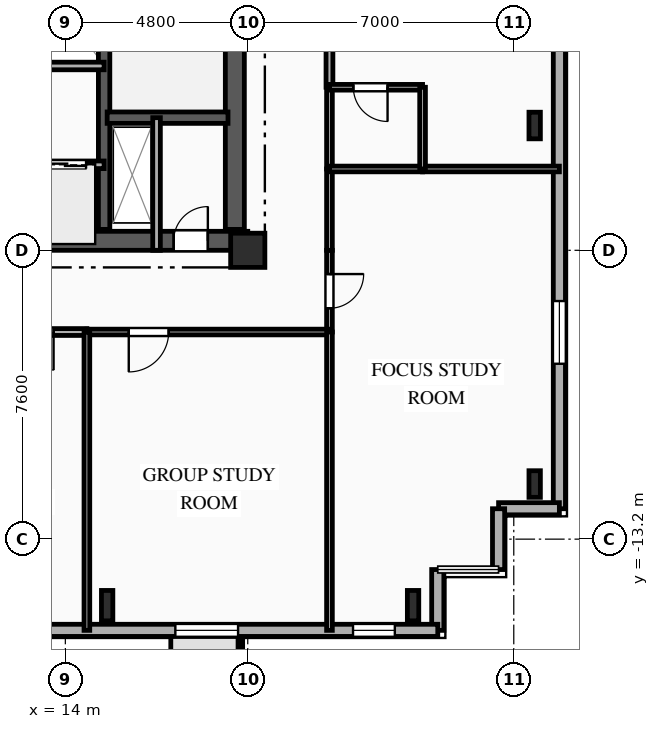
"""IFC4 building model, lengths in metres.
Left out: names, types, materials, properties, quantities, classifications, styles, units other than length and angle.
Written with IfcOpenShell. Run it as: python <this file> out.ifc"""

import sys

from ifc_helpers import new_model, si_unit, direction, frame, frame_2d, origin, origin_2d, place, context, subcontext, project, spatial, rectangle, i_section, extrude, element, fill, save


model = new_model("IFC4")
c1 = context("Model", 3, precision=1e-05, world=origin(), true_north=direction((0.0, 1.0)))
c2 = subcontext(c1, "Body", "Model", "MODEL_VIEW")
j1 = project(units=[si_unit("LENGTHUNIT", "METRE"), si_unit("PLANEANGLEUNIT", "RADIAN")], contexts=[c1])
p1 = place(None, origin())
s1 = spatial("IfcSite", under=j1, at=p1, CompositionType="ELEMENT")
p2 = place(p1, origin())
s2 = spatial("IfcBuilding", under=s1, at=p2, CompositionType="ELEMENT")
p3 = place(p2, frame((0.0, 0.0, 144.4)))
s3 = spatial("IfcBuildingStorey", under=s2, at=p3, CompositionType="ELEMENT", Elevation=144.4)
p4 = place(p3, frame((18.8, -5.6, 0.0), z_axis=(0.0, 0.0, 1.0), x_axis=(1.0, 0.0, 0.0)))
e1 = element("IfcColumn", 1, at=p4, inside=s3, PredefinedType="COLUMN", context=c2, shape_type="SweptSolid", body=[
    extrude(rectangle(XDim=0.9, YDim=0.9, at=origin_2d()), origin(), (0.0, 0.0, 1.0), 3.35),
])
for number, where, z_axis, x_axis in (
    (2, (15.1, -14.95, 0.0), (0.0, 0.0, 1.0), (1.0, 0.0, 0.0)),
    (3, (23.15, -14.95, 0.0), (0.0, 0.0, 1.0), (1.0, 0.0, 0.0)),
):
    element("IfcColumn", number, at=place(p3, frame(where, z_axis=z_axis, x_axis=x_axis)), inside=s3, PredefinedType="COLUMN", context=c2, shape_type="SweptSolid", body=[
        extrude(i_section(OverallWidth=0.3, OverallDepth=0.8, WebThickness=0.018, FlangeThickness=0.033, FilletRadius=0.03, at=origin_2d()), origin(), (0.0, 0.0, 1.0), 3.35),
    ])
for number, where, z_axis, x_axis in (
    (4, (26.35, -11.75, 0.0), (0.0, 0.0, 1.0), (1.0, 0.0, 0.0)),
    (5, (26.35, -2.317, 0.0), (0.0, 0.0, 1.0), (1.0, 0.0, 0.0)),
):
    element("IfcColumn", number, at=place(p3, frame(where, z_axis=z_axis, x_axis=x_axis)), inside=s3, PredefinedType="COLUMN", context=c2, shape_type="SweptSolid", body=[
        extrude(i_section(OverallWidth=0.3, OverallDepth=0.7, WebThickness=0.017, FlangeThickness=0.032, FilletRadius=0.027, at=origin_2d()), origin(), (0.0, 0.0, 1.0), 3.35),
    ])
p5 = place(p3, frame((27.0, 17.2, 0.0), z_axis=(0.0, 0.0, 1.0), x_axis=(0.0, -1.0, 0.0)))
e6 = element("IfcWall", 6, at=p5, inside=s3, PredefinedType="SOLIDWALL", context=c2, shape_type="SweptSolid", body=[
    extrude(rectangle(XDim=29.6, YDim=0.32, at=frame_2d((14.8, 0.0))), origin(), (0.0, 0.0, 1.0), 3.04),
])
p6 = place(p5, frame((3.895, 0.0, 0.85)))
e7 = element("IfcOpeningElement", 7, at=p6, cuts=e6, PredefinedType="OPENING", context=c2, shape_type="SweptSolid", body=[
    extrude(rectangle(XDim=1.65, YDim=1.85, at=frame_2d((0.825, 0.925))), frame((0.0, 0.17, 0.0), z_axis=(0.0, -1.0, 0.0), x_axis=(1.0, 0.0, 0.0)), (0.0, 0.0, 1.0), 0.34),
])
p7 = place(p5, frame((13.74, 0.0, 0.85)))
e8 = element("IfcOpeningElement", 8, at=p7, cuts=e6, PredefinedType="OPENING", context=c2, shape_type="SweptSolid", body=[
    extrude(rectangle(XDim=2.2, YDim=1.85, at=frame_2d((1.1, 0.925))), frame((0.0, 0.17, 0.0), z_axis=(0.0, -1.0, 0.0), x_axis=(1.0, 0.0, 0.0)), (0.0, 0.0, 1.0), 0.34),
])
p8 = place(p5, frame((24.135, 0.0, 0.85)))
e9 = element("IfcOpeningElement", 9, at=p8, cuts=e6, PredefinedType="OPENING", context=c2, shape_type="SweptSolid", body=[
    extrude(rectangle(XDim=1.65, YDim=1.85, at=frame_2d((0.825, 0.925))), frame((0.0, 0.17, 0.0), z_axis=(0.0, -1.0, 0.0), x_axis=(1.0, 0.0, 0.0)), (0.0, 0.0, 1.0), 0.34),
])
for number, where, z_axis, x_axis in (
    (10, (27.0, -12.4, 0.0), (0.0, 0.0, 1.0), (-1.0, 0.0, 0.0)),
    (11, (25.4, -12.4, 0.0), (0.0, 0.0, 1.0), (0.0, -1.0, 0.0)),
    (12, (23.8, -14.0, 0.0), (0.0, 0.0, 1.0), (0.0, -1.0, 0.0)),
):
    element("IfcWall", number, at=place(p3, frame(where, z_axis=z_axis, x_axis=x_axis)), inside=s3, PredefinedType="SOLIDWALL", context=c2, shape_type="SweptSolid", body=[
        extrude(rectangle(XDim=1.6, YDim=0.32, at=frame_2d((0.8, 0.0))), origin(), (0.0, 0.0, 1.0), 3.04),
    ])
p9 = place(p3, frame((23.8, -15.6, 0.0), z_axis=(0.0, 0.0, 1.0), x_axis=(-1.0, 0.0, 0.0)))
e13 = element("IfcWall", 13, at=p9, inside=s3, PredefinedType="SOLIDWALL", context=c2, shape_type="SweptSolid", body=[
    extrude(rectangle(XDim=49.6, YDim=0.32, at=frame_2d((24.8, 0.0))), origin(), (0.0, 0.0, 1.0), 3.04),
])
p10 = place(p9, frame((1.13, 0.0, 0.85)))
e14 = element("IfcOpeningElement", 14, at=p10, cuts=e13, PredefinedType="OPENING", context=c2, shape_type="SweptSolid", body=[
    extrude(rectangle(XDim=1.1, YDim=1.85, at=frame_2d((0.55, 0.925))), frame((0.0, 0.17, 0.0), z_axis=(0.0, -1.0, 0.0), x_axis=(1.0, 0.0, 0.0)), (0.0, 0.0, 1.0), 0.34),
])
p11 = place(p9, frame((5.255, 0.0, 0.85)))
e15 = element("IfcOpeningElement", 15, at=p11, cuts=e13, PredefinedType="OPENING", context=c2, shape_type="SweptSolid", body=[
    extrude(rectangle(XDim=1.65, YDim=1.85, at=frame_2d((0.825, 0.925))), frame((0.0, 0.17, 0.0), z_axis=(0.0, -1.0, 0.0), x_axis=(1.0, 0.0, 0.0)), (0.0, 0.0, 1.0), 0.34),
])
p12 = place(p9, frame((11.66, 0.0, 0.85)))
e16 = element("IfcOpeningElement", 16, at=p12, cuts=e13, PredefinedType="OPENING", context=c2, shape_type="SweptSolid", body=[
    extrude(rectangle(XDim=2.2, YDim=1.85, at=frame_2d((1.1, 0.925))), frame((0.0, 0.17, 0.0), z_axis=(0.0, -1.0, 0.0), x_axis=(1.0, 0.0, 0.0)), (0.0, 0.0, 1.0), 0.34),
])
p13 = place(p9, frame((18.66, 0.0, 0.85)))
e17 = element("IfcOpeningElement", 17, at=p13, cuts=e13, PredefinedType="OPENING", context=c2, shape_type="SweptSolid", body=[
    extrude(rectangle(XDim=2.2, YDim=1.85, at=frame_2d((1.1, 0.925))), frame((0.0, 0.17, 0.0), z_axis=(0.0, -1.0, 0.0), x_axis=(1.0, 0.0, 0.0)), (0.0, 0.0, 1.0), 0.34),
])
p14 = place(p9, frame((25.66, 0.0, 0.85)))
e18 = element("IfcOpeningElement", 18, at=p14, cuts=e13, PredefinedType="OPENING", context=c2, shape_type="SweptSolid", body=[
    extrude(rectangle(XDim=2.2, YDim=1.85, at=frame_2d((1.1, 0.925))), frame((0.0, 0.17, 0.0), z_axis=(0.0, -1.0, 0.0), x_axis=(1.0, 0.0, 0.0)), (0.0, 0.0, 1.0), 0.34),
])
p15 = place(p9, frame((33.268, 0.0, 0.85)))
e19 = element("IfcOpeningElement", 19, at=p15, cuts=e13, PredefinedType="OPENING", context=c2, shape_type="SweptSolid", body=[
    extrude(rectangle(XDim=2.2, YDim=1.85, at=frame_2d((1.1, 0.925))), frame((0.0, 0.17, 0.0), z_axis=(0.0, -1.0, 0.0), x_axis=(1.0, 0.0, 0.0)), (0.0, 0.0, 1.0), 0.34),
])
p16 = place(p9, frame((38.913, 0.0, 0.85)))
e20 = element("IfcOpeningElement", 20, at=p16, cuts=e13, PredefinedType="OPENING", context=c2, shape_type="SweptSolid", body=[
    extrude(rectangle(XDim=1.65, YDim=1.85, at=frame_2d((0.825, 0.925))), frame((0.0, 0.17, 0.0), z_axis=(0.0, -1.0, 0.0), x_axis=(1.0, 0.0, 0.0)), (0.0, 0.0, 1.0), 0.34),
])
p17 = place(p9, frame((45.895, 0.0, 0.85)))
e21 = element("IfcOpeningElement", 21, at=p17, cuts=e13, PredefinedType="OPENING", context=c2, shape_type="SweptSolid", body=[
    extrude(rectangle(XDim=1.65, YDim=1.85, at=frame_2d((0.825, 0.925))), frame((0.0, 0.17, 0.0), z_axis=(0.0, -1.0, 0.0), x_axis=(1.0, 0.0, 0.0)), (0.0, 0.0, 1.0), 0.34),
])
p18 = place(p3, frame((9.2, -5.35, 0.0), z_axis=(0.0, 0.0, 1.0), x_axis=(1.0, 0.0, 0.0)))
e22 = element("IfcWall", 22, at=p18, inside=s3, PredefinedType="SHEAR", context=c2, shape_type="SweptSolid", body=[
    extrude(rectangle(XDim=9.6, YDim=0.5, at=frame_2d((4.8, 0.0))), origin(), (0.0, 0.0, 1.0), 3.04),
])
p19 = place(p18, frame((7.65, 0.0, 0.0)))
e23 = element("IfcOpeningElement", 23, at=p19, cuts=e22, PredefinedType="OPENING", context=c2, shape_type="SweptSolid", body=[
    extrude(rectangle(XDim=0.9, YDim=2.1, at=frame_2d((0.45, 1.05))), frame((0.0, 0.26, 0.0), z_axis=(0.0, -1.0, 0.0), x_axis=(1.0, 0.0, 0.0)), (0.0, 0.0, 1.0), 0.52),
])
p20 = place(p3, frame((18.46, -5.05, 0.0), z_axis=(0.0, 0.0, 1.0), x_axis=(0.0, 1.0, 0.0)))
e24 = element("IfcWall", 24, at=p20, inside=s3, PredefinedType="SHEAR", context=c2, shape_type="SweptSolid", body=[
    extrude(rectangle(XDim=10.1, YDim=0.5, at=frame_2d((5.05, 0.0))), origin(), (0.0, 0.0, 1.0), 3.04),
])
p21 = place(p3, frame((15.02, -5.05, 0.0), z_axis=(0.0, 0.0, 1.0), x_axis=(0.0, 1.0, 0.0)))
e25 = element("IfcWall", 25, at=p21, inside=s3, PredefinedType="SHEAR", context=c2, shape_type="SweptSolid", body=[
    extrude(rectangle(XDim=10.1, YDim=0.3, at=frame_2d((5.05, 0.0))), origin(), (0.0, 0.0, 1.0), 3.04),
])
p22 = place(p3, frame((15.1, -2.11, 0.0), z_axis=(0.0, 0.0, 1.0), x_axis=(1.0, 0.0, 0.0)))
e26 = element("IfcWall", 26, at=p22, inside=s3, PredefinedType="SHEAR", context=c2, shape_type="SweptSolid", body=[
    extrude(rectangle(XDim=3.18, YDim=0.3, at=frame_2d((1.59, 0.0))), origin(), (0.0, 0.0, 1.0), 3.04),
])
p23 = place(p3, frame((16.4, -2.11, 0.0), z_axis=(0.0, 0.0, 1.0), x_axis=(0.0, -1.0, 0.0)))
e27 = element("IfcWall", 27, at=p23, inside=s3, PredefinedType="PARTITIONING", context=c2, shape_type="SweptSolid", body=[
    extrude(rectangle(XDim=3.49, YDim=0.2, at=frame_2d((1.745, 0.0))), origin(), (0.0, 0.0, 1.0), 3.04),
])
p24 = place(p3, frame((13.02, -3.35, 0.0), z_axis=(0.0, 0.0, 1.0), x_axis=(1.0, 0.0, 0.0)))
e28 = element("IfcWall", 28, at=p24, inside=s3, PredefinedType="PARTITIONING", context=c2, shape_type="SweptSolid", body=[
    extrude(rectangle(XDim=2.0, YDim=0.2, at=frame_2d((1.0, 0.0))), origin(), (0.0, 0.0, 1.0), 3.04),
])
p25 = place(p24, frame((0.475, 0.0, 0.0)))
e29 = element("IfcOpeningElement", 29, at=p25, cuts=e28, PredefinedType="OPENING", context=c2, shape_type="SweptSolid", body=[
    extrude(rectangle(XDim=1.05, YDim=2.1, at=frame_2d((0.525, 1.05))), frame((0.0, 0.11, 0.0), z_axis=(0.0, -1.0, 0.0), x_axis=(1.0, 0.0, 0.0)), (0.0, 0.0, 1.0), 0.22),
])
p26 = place(p3, frame((15.02, -0.75, 0.0), z_axis=(0.0, 0.0, 1.0), x_axis=(-1.0, 0.0, 0.0)))
e30 = element("IfcWall", 30, at=p26, inside=s3, PredefinedType="PARTITIONING", context=c2, shape_type="SweptSolid", body=[
    extrude(rectangle(XDim=1.68, YDim=0.2, at=frame_2d((0.84, 0.0))), origin(), (0.0, 0.0, 1.0), 3.04),
])
p27 = place(p3, frame((20.95, -5.6, 0.0), z_axis=(0.0, 0.0, 1.0), x_axis=(0.0, -1.0, 0.0)))
e31 = element("IfcWall", 31, at=p27, inside=s3, PredefinedType="PARTITIONING", context=c2, shape_type="SweptSolid", body=[
    extrude(rectangle(XDim=2.15, YDim=0.15, at=frame_2d((1.075, 0.0))), origin(), (0.0, 0.0, 1.0), 3.04),
])
p28 = place(p27, frame((0.625, 0.0, 0.0)))
e32 = element("IfcOpeningElement", 32, at=p28, cuts=e31, PredefinedType="OPENING", context=c2, shape_type="SweptSolid", body=[
    extrude(rectangle(XDim=0.9, YDim=2.1, at=frame_2d((0.45, 1.05))), frame((0.0, 0.085, 0.0), z_axis=(0.0, -1.0, 0.0), x_axis=(1.0, 0.0, 0.0)), (0.0, 0.0, 1.0), 0.17),
])
p29 = place(p3, frame((14.567, -7.75, 0.0), z_axis=(0.0, 0.0, 1.0), x_axis=(-1.0, 0.0, 0.0)))
e33 = element("IfcWall", 33, at=p29, inside=s3, PredefinedType="PARTITIONING", context=c2, shape_type="SweptSolid", body=[
    extrude(rectangle(XDim=4.534, YDim=0.18, at=frame_2d((2.267, 0.0))), origin(), (0.0, 0.0, 1.0), 3.04),
])
p30 = place(p29, frame((0.877, 0.0, 0.0)))
e34 = element("IfcOpeningElement", 34, at=p30, cuts=e33, PredefinedType="OPENING", context=c2, shape_type="SweptSolid", body=[
    extrude(rectangle(XDim=1.0, YDim=2.15, at=frame_2d((0.5, 1.075))), frame((0.0, 0.1, 0.0), z_axis=(0.0, -1.0, 0.0), x_axis=(1.0, 0.0, 0.0)), (0.0, 0.0, 1.0), 0.2),
])
p31 = place(p3, frame((20.95, -7.75, 0.0), z_axis=(0.0, 0.0, 1.0), x_axis=(-1.0, 0.0, 0.0)))
e35 = element("IfcWall", 35, at=p31, inside=s3, PredefinedType="PARTITIONING", context=c2, shape_type="SweptSolid", body=[
    extrude(rectangle(XDim=6.383, YDim=0.15, at=frame_2d((3.191, 0.0))), origin(), (0.0, 0.0, 1.0), 3.04),
])
p32 = place(p31, frame((4.231, 0.0, 0.0)))
e36 = element("IfcOpeningElement", 36, at=p32, cuts=e35, PredefinedType="OPENING", context=c2, shape_type="SweptSolid", body=[
    extrude(rectangle(XDim=1.05, YDim=2.15, at=frame_2d((0.525, 1.075))), frame((0.0, 0.085, 0.0), z_axis=(0.0, -1.0, 0.0), x_axis=(1.0, 0.0, 0.0)), (0.0, 0.0, 1.0), 0.17),
])
p33 = place(p3, frame((20.95, -3.46, 0.0), z_axis=(0.0, 0.0, 1.0), x_axis=(0.0, -1.0, 0.0)))
e37 = element("IfcWall", 37, at=p33, inside=s3, PredefinedType="PARTITIONING", context=c2, shape_type="SweptSolid", body=[
    extrude(rectangle(XDim=2.14, YDim=0.15, at=frame_2d((1.07, 0.0))), origin(), (0.0, 0.0, 1.0), 3.04),
])
p34 = place(p3, frame((20.95, 8.26, 0.0), z_axis=(0.0, 0.0, 1.0), x_axis=(0.0, -1.0, 0.0)))
e38 = element("IfcWall", 38, at=p34, inside=s3, PredefinedType="PARTITIONING", context=c2, shape_type="SweptSolid", body=[
    extrude(rectangle(XDim=9.57, YDim=0.18, at=frame_2d((4.785, 0.0))), origin(), (0.0, 0.0, 1.0), 3.04),
])
p35 = place(p34, frame((7.064, 0.0, 0.0)))
e39 = element("IfcOpeningElement", 39, at=p35, cuts=e38, PredefinedType="OPENING", context=c2, shape_type="SweptSolid", body=[
    extrude(rectangle(XDim=1.0, YDim=2.15, at=frame_2d((0.5, 1.075))), frame((0.0, 0.1, 0.0), z_axis=(0.0, -1.0, 0.0), x_axis=(1.0, 0.0, 0.0)), (0.0, 0.0, 1.0), 0.2),
])
p36 = place(p3, frame((20.95, -1.31, 0.0), z_axis=(0.0, 0.0, 1.0), x_axis=(0.0, -1.0, 0.0)))
e40 = element("IfcWall", 40, at=p36, inside=s3, PredefinedType="PLUMBINGWALL", context=c2, shape_type="SweptSolid", body=[
    extrude(rectangle(XDim=2.15, YDim=0.15, at=frame_2d((1.075, 0.0))), origin(), (0.0, 0.0, 1.0), 3.04),
])
p37 = place(p3, frame((23.4, -3.46, 0.0), z_axis=(0.0, 0.0, 1.0), x_axis=(1.0, 0.0, 0.0)))
e41 = element("IfcWall", 41, at=p37, inside=s3, PredefinedType="PARTITIONING", context=c2, shape_type="SweptSolid", body=[
    extrude(rectangle(XDim=3.6, YDim=0.15, at=frame_2d((1.8, 0.0))), origin(), (0.0, 0.0, 1.0), 3.04),
])
p38 = place(p3, frame((20.95, -3.46, 0.0), z_axis=(0.0, 0.0, 1.0), x_axis=(1.0, 0.0, 0.0)))
e42 = element("IfcWall", 42, at=p38, inside=s3, PredefinedType="PLUMBINGWALL", context=c2, shape_type="SweptSolid", body=[
    extrude(rectangle(XDim=2.45, YDim=0.15, at=frame_2d((1.225, 0.0))), origin(), (0.0, 0.0, 1.0), 3.04),
])
p39 = place(p3, frame((20.95, -15.6, 0.0), z_axis=(0.0, 0.0, 1.0), x_axis=(0.0, 1.0, 0.0)))
e43 = element("IfcWall", 43, at=p39, inside=s3, PredefinedType="PARTITIONING", context=c2, shape_type="SweptSolid", body=[
    extrude(rectangle(XDim=7.85, YDim=0.15, at=frame_2d((3.925, 0.0))), origin(), (0.0, 0.0, 1.0), 3.04),
])
p40 = place(p3, frame((23.4, -1.31, 0.0), z_axis=(0.0, 0.0, 1.0), x_axis=(-1.0, 0.0, 0.0)))
e44 = element("IfcWall", 44, at=p40, inside=s3, PredefinedType="PLUMBINGWALL", context=c2, shape_type="SweptSolid", body=[
    extrude(rectangle(XDim=2.45, YDim=0.15, at=frame_2d((1.225, 0.0))), origin(), (0.0, 0.0, 1.0), 3.04),
])
p41 = place(p40, frame((0.921, 0.0, 0.0)))
e45 = element("IfcOpeningElement", 45, at=p41, cuts=e44, PredefinedType="OPENING", context=c2, shape_type="SweptSolid", body=[
    extrude(rectangle(XDim=0.9, YDim=2.1, at=frame_2d((0.45, 1.05))), frame((0.0, 0.085, 0.0), z_axis=(0.0, -1.0, 0.0), x_axis=(1.0, 0.0, 0.0)), (0.0, 0.0, 1.0), 0.17),
])
p42 = place(p3, frame((23.4, -3.46, 0.0), z_axis=(0.0, 0.0, 1.0), x_axis=(0.0, 1.0, 0.0)))
e46 = element("IfcWall", 46, at=p42, inside=s3, PredefinedType="PLUMBINGWALL", context=c2, shape_type="SweptSolid", body=[
    extrude(rectangle(XDim=2.15, YDim=0.15, at=frame_2d((1.075, 0.0))), origin(), (0.0, 0.0, 1.0), 3.04),
])
p43 = place(p3, frame((14.567, -7.75, 0.0), z_axis=(0.0, 0.0, 1.0), x_axis=(0.0, -1.0, 0.0)))
e47 = element("IfcWall", 47, at=p43, inside=s3, PredefinedType="PARTITIONING", context=c2, shape_type="SweptSolid", body=[
    extrude(rectangle(XDim=7.85, YDim=0.15, at=frame_2d((3.925, 0.0))), origin(), (0.0, 0.0, 1.0), 3.04),
])
p44 = place(p8, origin())
e48 = element("IfcWindow", 48, at=p44, inside=s3, PartitioningType="SINGLE_PANEL", PredefinedType="WINDOW", context=c2, shape_type="SweptSolid", body=[
    extrude(rectangle(XDim=1.65, YDim=1.85, at=frame_2d((0.825, 0.925))), frame((0.0, 0.03, 0.0), z_axis=(0.0, -1.0, 0.0), x_axis=(1.0, 0.0, 0.0)), (0.0, 0.0, 1.0), 0.06),
])
fill(e9, e48)
p45 = place(p10, origin())
e49 = element("IfcWindow", 49, at=p45, inside=s3, PartitioningType="SINGLE_PANEL", PredefinedType="WINDOW", context=c2, shape_type="SweptSolid", body=[
    extrude(rectangle(XDim=1.1, YDim=1.85, at=frame_2d((0.55, 0.925))), frame((0.0, 0.03, 0.0), z_axis=(0.0, -1.0, 0.0), x_axis=(1.0, 0.0, 0.0)), (0.0, 0.0, 1.0), 0.06),
])
fill(e14, e49)
p46 = place(p11, origin())
e50 = element("IfcWindow", 50, at=p46, inside=s3, PartitioningType="SINGLE_PANEL", PredefinedType="WINDOW", context=c2, shape_type="SweptSolid", body=[
    extrude(rectangle(XDim=1.65, YDim=1.85, at=frame_2d((0.825, 0.925))), frame((0.0, 0.03, 0.0), z_axis=(0.0, -1.0, 0.0), x_axis=(1.0, 0.0, 0.0)), (0.0, 0.0, 1.0), 0.06),
])
fill(e15, e50)
p47 = place(p19, origin())
e51 = element("IfcDoor", 51, at=p47, inside=s3, OperationType="SINGLE_SWING_RIGHT", PredefinedType="DOOR", context=c2, shape_type="SweptSolid", body=[
    extrude(rectangle(XDim=0.9, YDim=2.1, at=frame_2d((0.45, 1.05))), frame((0.0, 0.025, 0.0), z_axis=(0.0, -1.0, 0.0), x_axis=(1.0, 0.0, 0.0)), (0.0, 0.0, 1.0), 0.05),
])
fill(e23, e51)
p48 = place(p25, origin())
e52 = element("IfcDoor", 52, at=p48, inside=s3, OperationType="DOUBLE_DOOR_SLIDING", PredefinedType="DOOR", context=c2, shape_type="SweptSolid", body=[
    extrude(rectangle(XDim=1.05, YDim=2.1, at=frame_2d((0.525, 1.05))), frame((0.0, 0.025, 0.0), z_axis=(0.0, -1.0, 0.0), x_axis=(1.0, 0.0, 0.0)), (0.0, 0.0, 1.0), 0.05),
])
fill(e29, e52)
p49 = place(p28, origin())
e53 = element("IfcDoor", 53, at=p49, inside=s3, OperationType="SINGLE_SWING_LEFT", PredefinedType="DOOR", context=c2, shape_type="SweptSolid", body=[
    extrude(rectangle(XDim=0.9, YDim=2.1, at=frame_2d((0.45, 1.05))), frame((0.0, 0.025, 0.0), z_axis=(0.0, -1.0, 0.0), x_axis=(1.0, 0.0, 0.0)), (0.0, 0.0, 1.0), 0.05),
])
fill(e32, e53)
p50 = place(p30, origin())
e54 = element("IfcDoor", 54, at=p50, inside=s3, OperationType="SINGLE_SWING_LEFT", PredefinedType="DOOR", context=c2, shape_type="SweptSolid", body=[
    extrude(rectangle(XDim=1.0, YDim=2.15, at=frame_2d((0.5, 1.075))), frame((0.0, 0.025, 0.0), z_axis=(0.0, -1.0, 0.0), x_axis=(1.0, 0.0, 0.0)), (0.0, 0.0, 1.0), 0.05),
])
fill(e34, e54)
p51 = place(p32, origin())
e55 = element("IfcDoor", 55, at=p51, inside=s3, OperationType="SINGLE_SWING_RIGHT", PredefinedType="DOOR", context=c2, shape_type="SweptSolid", body=[
    extrude(rectangle(XDim=1.05, YDim=2.15, at=frame_2d((0.525, 1.075))), frame((0.0, 0.025, 0.0), z_axis=(0.0, -1.0, 0.0), x_axis=(1.0, 0.0, 0.0)), (0.0, 0.0, 1.0), 0.05),
])
fill(e36, e55)
p52 = place(p41, origin())
e56 = element("IfcDoor", 56, at=p52, inside=s3, OperationType="SINGLE_SWING_LEFT", PredefinedType="DOOR", context=c2, shape_type="SweptSolid", body=[
    extrude(rectangle(XDim=0.9, YDim=2.1, at=frame_2d((0.45, 1.05))), frame((0.0, 0.025, 0.0), z_axis=(0.0, -1.0, 0.0), x_axis=(1.0, 0.0, 0.0)), (0.0, 0.0, 1.0), 0.05),
])
fill(e45, e56)
save(model, sys.argv[1])
